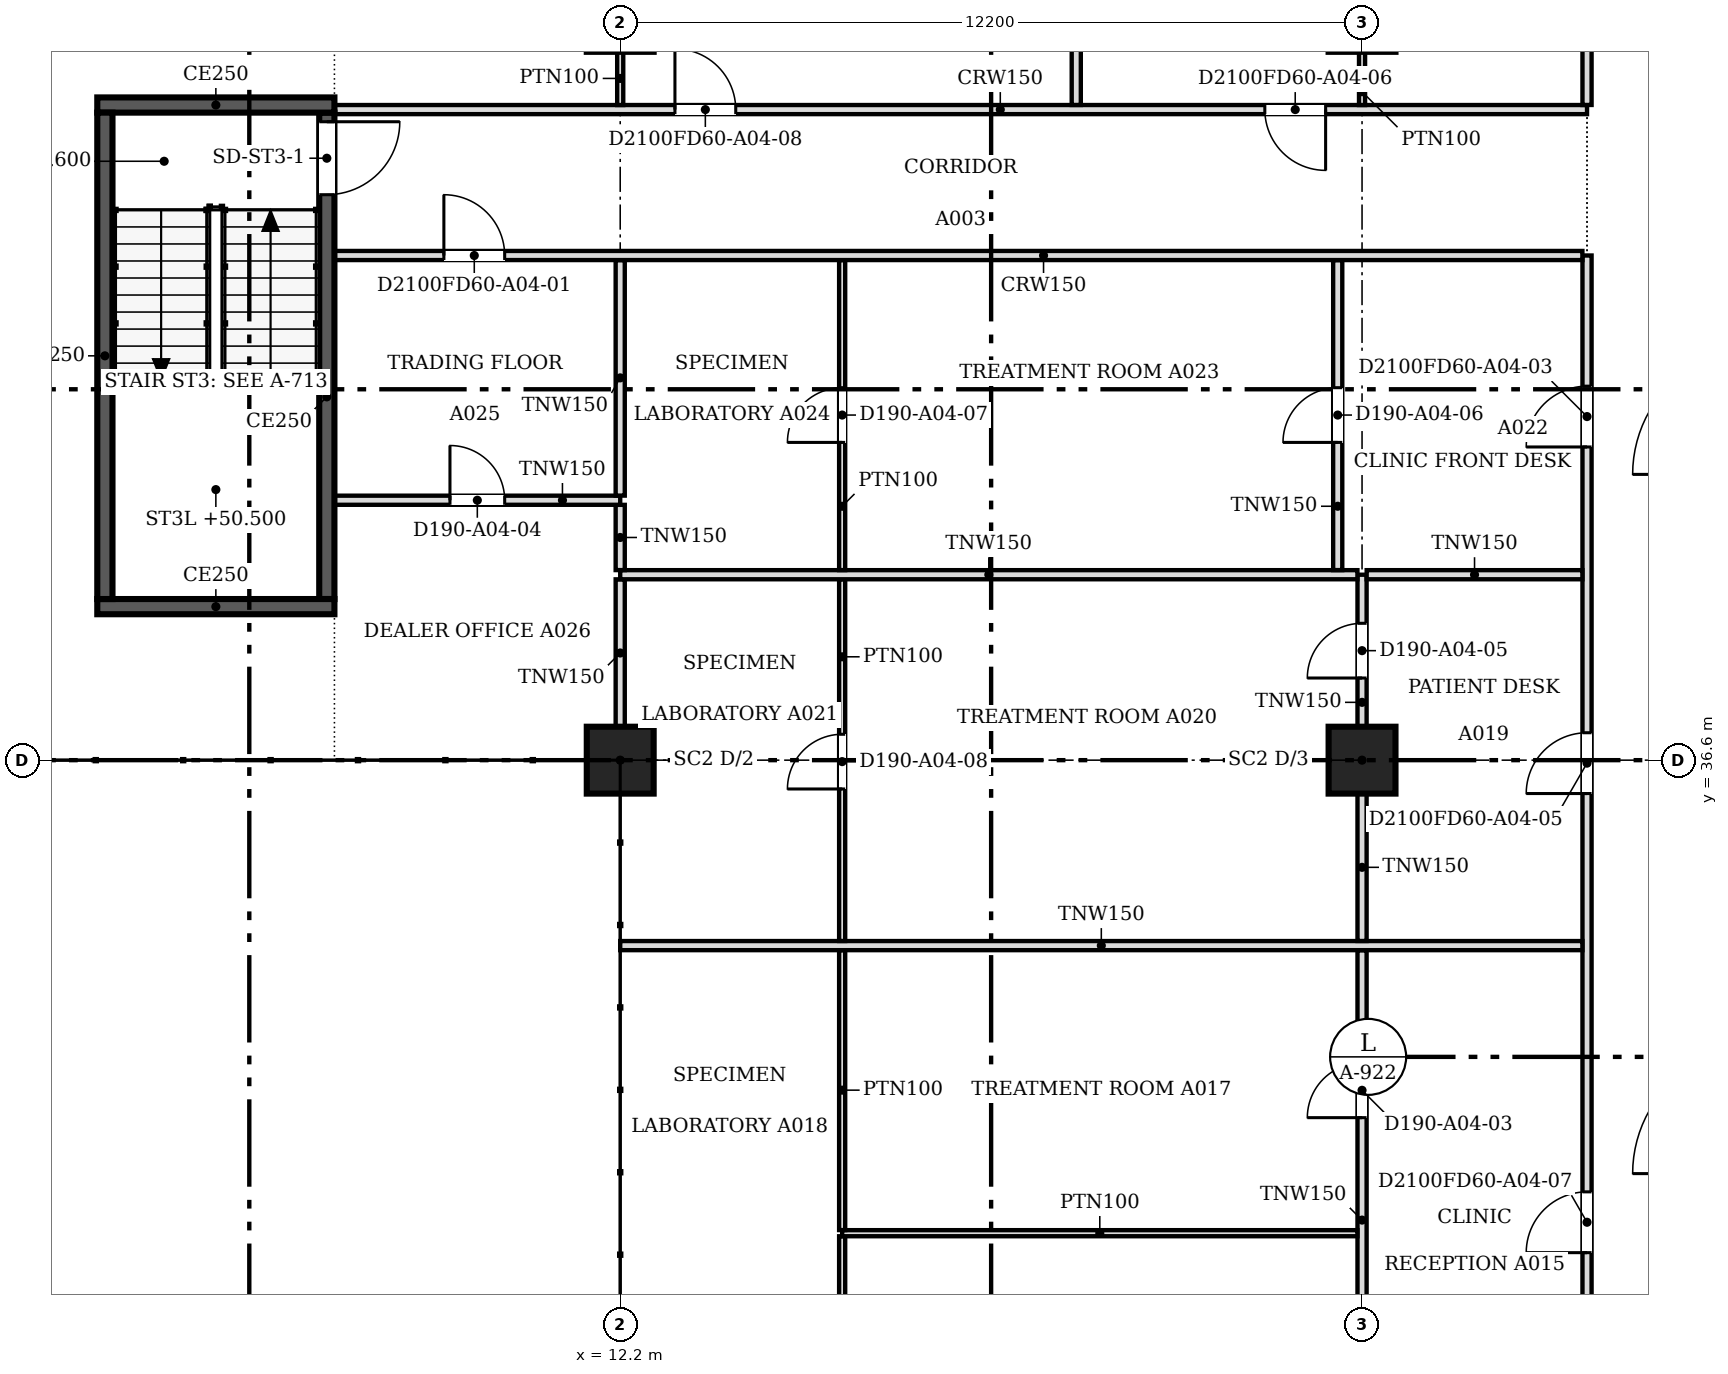
"""IFC4 building model, lengths in metres.
Left out: names, types, materials, properties, quantities, classifications, styles, units other than length and angle.
Written with IfcOpenShell. Run it as: python <this file> out.ifc"""

import sys

from ifc_helpers import new_model, si_unit, direction, frame, frame_2d, origin, origin_2d, place, context, subcontext, project, spatial, rectangle, extrude, source, transform, mapped, element, fill, save


model = new_model("IFC4")
c1 = context("Model", 3, precision=1e-05, world=origin(), true_north=direction((0.0, 1.0)))
c2 = subcontext(c1, "Body", "Model", "MODEL_VIEW")
j1 = project(units=[si_unit("LENGTHUNIT", "METRE"), si_unit("PLANEANGLEUNIT", "RADIAN")], contexts=[c1])
p1 = place(None, origin())
s1 = spatial("IfcSite", under=j1, at=p1, CompositionType="ELEMENT")
p2 = place(p1, origin())
s2 = spatial("IfcBuilding", under=s1, at=p2, CompositionType="ELEMENT")
p3 = place(p2, frame((0.0, 0.0, 48.6)))
s3 = spatial("IfcBuildingStorey", under=s2, at=p3, CompositionType="ELEMENT", Elevation=48.6)
for number, where, z_axis, x_axis in (
    (1, (12.2, 36.6, 0.0), (0.0, 0.0, 1.0), (1.0, 0.0, 0.0)),
    (2, (24.4, 36.6, 0.0), (0.0, 0.0, 1.0), (1.0, 0.0, 0.0)),
):
    element("IfcColumn", number, at=place(p3, frame(where, z_axis=z_axis, x_axis=x_axis)), inside=s3, PredefinedType="COLUMN", context=c2, shape_type="SweptSolid", body=[
        extrude(rectangle(XDim=1.1, YDim=1.1, at=origin_2d()), origin(), (0.0, 0.0, 1.0), 3.6),
    ])
p4 = place(p3, frame((7.5, 39.125, 0.0), z_axis=(0.0, 0.0, 1.0), x_axis=(-1.0, 0.0, 0.0)))
e3 = element("IfcWall", 3, at=p4, inside=s3, PredefinedType="SOLIDWALL", context=c2, shape_type="SweptSolid", body=[
    extrude(rectangle(XDim=3.9, YDim=0.25, at=frame_2d((1.95, 0.0))), origin(), (0.0, 0.0, 1.0), 3.8),
])
p5 = place(p3, frame((3.725, 39.25, 0.0), z_axis=(0.0, 0.0, 1.0), x_axis=(0.0, 1.0, 0.0)))
e4 = element("IfcWall", 4, at=p5, inside=s3, PredefinedType="SOLIDWALL", context=c2, shape_type="SweptSolid", body=[
    extrude(rectangle(XDim=8.0, YDim=0.25, at=frame_2d((4.0, 0.0))), origin(), (0.0, 0.0, 1.0), 3.8),
])
p6 = place(p3, frame((3.6, 47.375, 0.0), z_axis=(0.0, 0.0, 1.0), x_axis=(1.0, 0.0, 0.0)))
e5 = element("IfcWall", 5, at=p6, inside=s3, PredefinedType="SOLIDWALL", context=c2, shape_type="SweptSolid", body=[
    extrude(rectangle(XDim=3.9, YDim=0.25, at=frame_2d((1.95, 0.0))), origin(), (0.0, 0.0, 1.0), 3.8),
])
p7 = place(p3, frame((7.375, 47.25, 0.0), z_axis=(0.0, 0.0, 1.0), x_axis=(0.0, -1.0, 0.0)))
e6 = element("IfcWall", 6, at=p7, inside=s3, PredefinedType="SOLIDWALL", context=c2, shape_type="SweptSolid", body=[
    extrude(rectangle(XDim=8.0, YDim=0.25, at=frame_2d((4.0, 0.0))), origin(), (0.0, 0.0, 1.0), 3.8),
])
m1 = source(origin(), c2, "Body", "SweptSolid", [
    extrude(rectangle(XDim=1.2, YDim=2.1, at=frame_2d((0.6, 1.05))), frame((0.0, 0.135, 0.0), z_axis=(0.0, -1.0, 0.0), x_axis=(1.0, 0.0, 0.0)), (0.0, 0.0, 1.0), 0.27),
])
p8 = place(p7, frame((0.15, 0.0, 0.0)))
e7 = element("IfcOpeningElement", 7, at=p8, cuts=e6, PredefinedType="OPENING", context=c2, shape_type="MappedRepresentation", body=[
    mapped(m1, transform((0.0, 0.0, 0.0), scale=1.0)),
])
p9 = place(p3, frame((28.1, 18.8, 0.0), z_axis=(0.0, 0.0, 1.0), x_axis=(0.0, 1.0, 0.0)))
e8 = element("IfcWall", 8, at=p9, inside=s3, PredefinedType="PARTITIONING", context=c2, shape_type="SweptSolid", body=[
    extrude(rectangle(XDim=26.1, YDim=0.15, at=frame_2d((13.05, 0.0))), origin(), (0.0, 0.0, 1.0), 3.067),
])
m2 = source(origin(), c2, "Body", "SweptSolid", [
    extrude(rectangle(XDim=0.9, YDim=2.1, at=frame_2d((0.45, 1.05))), frame((0.0, 0.085, 0.0), z_axis=(0.0, -1.0, 0.0), x_axis=(1.0, 0.0, 0.0)), (0.0, 0.0, 1.0), 0.17),
])
p10 = place(p9, frame((1.1, 0.0, 0.0)))
e9 = element("IfcOpeningElement", 9, at=p10, cuts=e8, PredefinedType="OPENING", context=c2, shape_type="MappedRepresentation", body=[
    mapped(m2, transform((0.0, 0.0, 0.0), scale=1.0)),
])
m3 = source(origin(), c2, "Body", "SweptSolid", [
    extrude(rectangle(XDim=1.0, YDim=2.1, at=frame_2d((0.5, 1.05))), frame((0.0, 0.085, 0.0), z_axis=(0.0, -1.0, 0.0), x_axis=(1.0, 0.0, 0.0)), (0.0, 0.0, 1.0), 0.17),
])
p11 = place(p9, frame((22.951, 0.0, 0.0)))
e10 = element("IfcOpeningElement", 10, at=p11, cuts=e8, PredefinedType="OPENING", context=c2, shape_type="MappedRepresentation", body=[
    mapped(m3, transform((0.0, 0.0, 0.0), scale=1.0)),
])
p12 = place(p9, frame((17.251, 0.0, 0.0)))
e11 = element("IfcOpeningElement", 11, at=p12, cuts=e8, PredefinedType="OPENING", context=c2, shape_type="MappedRepresentation", body=[
    mapped(m3, transform((0.0, 0.0, 0.0), scale=1.0)),
])
p13 = place(p9, frame((9.7, 0.0, 0.0)))
e12 = element("IfcOpeningElement", 12, at=p13, cuts=e8, PredefinedType="OPENING", context=c2, shape_type="MappedRepresentation", body=[
    mapped(m3, transform((0.0, 0.0, 0.0), scale=1.0)),
])
p14 = place(p3, frame((15.85, 24.476, 0.0), z_axis=(0.0, 0.0, 1.0), x_axis=(0.0, 1.0, 0.0)))
e13 = element("IfcWall", 13, at=p14, inside=s3, PredefinedType="PARTITIONING", context=c2, shape_type="SweptSolid", body=[
    extrude(rectangle(XDim=4.293, YDim=0.1, at=frame_2d((2.146, 0.0))), origin(), (0.0, 0.0, 1.0), 3.067),
])
m4 = source(origin(), c2, "Body", "SweptSolid", [
    extrude(rectangle(XDim=0.9, YDim=2.1, at=frame_2d((0.45, 1.05))), frame((0.0, 0.06, 0.0), z_axis=(0.0, -1.0, 0.0), x_axis=(1.0, 0.0, 0.0)), (0.0, 0.0, 1.0), 0.12),
])
p15 = place(p14, frame((1.7, 0.0, 0.0)))
e14 = element("IfcOpeningElement", 14, at=p15, cuts=e13, PredefinedType="OPENING", context=c2, shape_type="MappedRepresentation", body=[
    mapped(m4, transform((0.0, 0.0, 0.0), scale=1.0)),
])
p16 = place(p3, frame((24.4, 24.951, 0.0), z_axis=(0.0, 0.0, 1.0), x_axis=(0.0, 1.0, 0.0)))
e15 = element("IfcWall", 15, at=p16, inside=s3, PredefinedType="PARTITIONING", context=c2, shape_type="SweptSolid", body=[
    extrude(rectangle(XDim=8.523, YDim=0.15, at=frame_2d((4.262, 0.0))), origin(), (0.0, 0.0, 1.0), 3.067),
])
p17 = place(p16, frame((1.5, 0.0, 0.0)))
e16 = element("IfcOpeningElement", 16, at=p17, cuts=e15, PredefinedType="OPENING", context=c2, shape_type="MappedRepresentation", body=[
    mapped(m2, transform((0.0, 0.0, 0.0), scale=1.0)),
])
p18 = place(p16, frame((5.769, 0.0, 0.0)))
e17 = element("IfcOpeningElement", 17, at=p18, cuts=e15, PredefinedType="OPENING", context=c2, shape_type="MappedRepresentation", body=[
    mapped(m2, transform((0.0, 0.0, 0.0), scale=1.0)),
])
p19 = place(p3, frame((15.85, 28.82, 0.0), z_axis=(0.0, 0.0, 1.0), x_axis=(1.0, 0.0, 0.0)))
e18 = element("IfcWall", 18, at=p19, inside=s3, PredefinedType="PARTITIONING", context=c2, shape_type="SweptSolid", body=[
    extrude(rectangle(XDim=8.474, YDim=0.1, at=frame_2d((4.237, 0.0))), origin(), (0.0, 0.0, 1.0), 3.067),
])
p20 = place(p3, frame((15.85, 28.871, 0.0), z_axis=(0.0, 0.0, 1.0), x_axis=(0.0, 1.0, 0.0)))
e19 = element("IfcWall", 19, at=p20, inside=s3, PredefinedType="PARTITIONING", context=c2, shape_type="SweptSolid", body=[
    extrude(rectangle(XDim=4.603, YDim=0.1, at=frame_2d((2.301, 0.0))), origin(), (0.0, 0.0, 1.0), 3.067),
])
p21 = place(p3, frame((12.2, 33.55, 0.0), z_axis=(0.0, 0.0, 1.0), x_axis=(1.0, 0.0, 0.0)))
e20 = element("IfcWall", 20, at=p21, inside=s3, PredefinedType="PARTITIONING", context=c2, shape_type="SweptSolid", body=[
    extrude(rectangle(XDim=15.824, YDim=0.15, at=frame_2d((7.912, 0.0))), origin(), (0.0, 0.0, 1.0), 3.067),
])
p22 = place(p3, frame((15.85, 33.626, 0.0), z_axis=(0.0, 0.0, 1.0), x_axis=(0.0, 1.0, 0.0)))
e21 = element("IfcWall", 21, at=p22, inside=s3, PredefinedType="PARTITIONING", context=c2, shape_type="SweptSolid", body=[
    extrude(rectangle(XDim=5.948, YDim=0.1, at=frame_2d((2.974, 0.0))), origin(), (0.0, 0.0, 1.0), 3.067),
])
p23 = place(p22, frame((2.5, 0.0, 0.0)))
e22 = element("IfcOpeningElement", 22, at=p23, cuts=e21, PredefinedType="OPENING", context=c2, shape_type="MappedRepresentation", body=[
    mapped(m4, transform((0.0, 0.0, 0.0), scale=1.0)),
])
for number, where, z_axis, x_axis in (
    (23, (24.4, 33.626, 0.0), (0.0, 0.0, 1.0), (0.0, 1.0, 0.0)),
    (24, (12.2, 37.151, 0.0), (0.0, 0.0, 1.0), (0.0, 1.0, 0.0)),
):
    element("IfcWall", number, at=place(p3, frame(where, z_axis=z_axis, x_axis=x_axis)), inside=s3, PredefinedType="PARTITIONING", context=c2, shape_type="SweptSolid", body=[
        extrude(rectangle(XDim=2.423, YDim=0.15, at=frame_2d((1.211, 0.0))), origin(), (0.0, 0.0, 1.0), 3.067),
    ])
p24 = place(p3, frame((24.4, 37.151, 0.0), z_axis=(0.0, 0.0, 1.0), x_axis=(0.0, 1.0, 0.0)))
e25 = element("IfcWall", 25, at=p24, inside=s3, PredefinedType="PARTITIONING", context=c2, shape_type="SweptSolid", body=[
    extrude(rectangle(XDim=2.499, YDim=0.15, at=frame_2d((1.25, 0.0))), origin(), (0.0, 0.0, 1.0), 3.067),
])
p25 = place(p24, frame((0.8, 0.0, 0.0)))
e26 = element("IfcOpeningElement", 26, at=p25, cuts=e25, PredefinedType="OPENING", context=c2, shape_type="MappedRepresentation", body=[
    mapped(m2, transform((0.0, 0.0, 0.0), scale=1.0)),
])
p26 = place(p3, frame((12.2, 39.65, 0.0), z_axis=(0.0, 0.0, 1.0), x_axis=(1.0, 0.0, 0.0)))
e27 = element("IfcWall", 27, at=p26, inside=s3, PredefinedType="PARTITIONING", context=c2, shape_type="SweptSolid", body=[
    extrude(rectangle(XDim=12.124, YDim=0.15, at=frame_2d((6.062, 0.0))), origin(), (0.0, 0.0, 1.0), 3.067),
])
p27 = place(p3, frame((24.476, 39.65, 0.0), z_axis=(0.0, 0.0, 1.0), x_axis=(1.0, 0.0, 0.0)))
e28 = element("IfcWall", 28, at=p27, inside=s3, PredefinedType="PARTITIONING", context=c2, shape_type="SweptSolid", body=[
    extrude(rectangle(XDim=3.548, YDim=0.15, at=frame_2d((1.774, 0.0))), origin(), (0.0, 0.0, 1.0), 3.067),
])
p28 = place(p3, frame((12.2, 39.726, 0.0), z_axis=(0.0, 0.0, 1.0), x_axis=(0.0, 1.0, 0.0)))
e29 = element("IfcWall", 29, at=p28, inside=s3, PredefinedType="PARTITIONING", context=c2, shape_type="SweptSolid", body=[
    extrude(rectangle(XDim=1.073, YDim=0.15, at=frame_2d((0.537, 0.0))), origin(), (0.0, 0.0, 1.0), 3.067),
])
p29 = place(p3, frame((15.85, 39.726, 0.0), z_axis=(0.0, 0.0, 1.0), x_axis=(0.0, 1.0, 0.0)))
e30 = element("IfcWall", 30, at=p29, inside=s3, PredefinedType="PARTITIONING", context=c2, shape_type="SweptSolid", body=[
    extrude(rectangle(XDim=5.098, YDim=0.1, at=frame_2d((2.549, 0.0))), origin(), (0.0, 0.0, 1.0), 3.067),
])
p30 = place(p29, frame((2.1, 0.0, 0.0)))
e31 = element("IfcOpeningElement", 31, at=p30, cuts=e30, PredefinedType="OPENING", context=c2, shape_type="MappedRepresentation", body=[
    mapped(m4, transform((0.0, 0.0, 0.0), scale=1.0)),
])
p31 = place(p3, frame((24.0, 39.726, 0.0), z_axis=(0.0, 0.0, 1.0), x_axis=(0.0, 1.0, 0.0)))
e32 = element("IfcWall", 32, at=p31, inside=s3, PredefinedType="PARTITIONING", context=c2, shape_type="SweptSolid", body=[
    extrude(rectangle(XDim=5.098, YDim=0.15, at=frame_2d((2.549, 0.0))), origin(), (0.0, 0.0, 1.0), 3.067),
])
p32 = place(p31, frame((2.1, 0.0, 0.0)))
e33 = element("IfcOpeningElement", 33, at=p32, cuts=e32, PredefinedType="OPENING", context=c2, shape_type="MappedRepresentation", body=[
    mapped(m2, transform((0.0, 0.0, 0.0), scale=1.0)),
])
p33 = place(p3, frame((12.2, 40.875, 0.0), z_axis=(0.0, 0.0, 1.0), x_axis=(-1.0, 0.0, 0.0)))
e34 = element("IfcWall", 34, at=p33, inside=s3, PredefinedType="PARTITIONING", context=c2, shape_type="SweptSolid", body=[
    extrude(rectangle(XDim=4.7, YDim=0.15, at=frame_2d((2.35, 0.0))), origin(), (0.0, 0.0, 1.0), 3.067),
])
p34 = place(p33, frame((1.9, 0.0, 0.0)))
e35 = element("IfcOpeningElement", 35, at=p34, cuts=e34, PredefinedType="OPENING", context=c2, shape_type="MappedRepresentation", body=[
    mapped(m2, transform((0.0, 0.0, 0.0), scale=1.0)),
])
p35 = place(p3, frame((12.2, 40.951, 0.0), z_axis=(0.0, 0.0, 1.0), x_axis=(0.0, 1.0, 0.0)))
e36 = element("IfcWall", 36, at=p35, inside=s3, PredefinedType="PARTITIONING", context=c2, shape_type="SweptSolid", body=[
    extrude(rectangle(XDim=3.873, YDim=0.15, at=frame_2d((1.937, 0.0))), origin(), (0.0, 0.0, 1.0), 3.067),
])
p36 = place(p3, frame((28.024, 44.9, 0.0), z_axis=(0.0, 0.0, 1.0), x_axis=(-1.0, 0.0, 0.0)))
e37 = element("IfcWall", 37, at=p36, inside=s3, PredefinedType="PARTITIONING", context=c2, shape_type="SweptSolid", body=[
    extrude(rectangle(XDim=20.524, YDim=0.15, at=frame_2d((10.262, 0.0))), origin(), (0.0, 0.0, 1.0), 3.067),
])
p37 = place(p36, frame((17.724, 0.0, 0.0)))
e38 = element("IfcOpeningElement", 38, at=p37, cuts=e37, PredefinedType="OPENING", context=c2, shape_type="MappedRepresentation", body=[
    mapped(m3, transform((0.0, 0.0, 0.0), scale=1.0)),
])
p38 = place(p3, frame((7.5, 47.3, 0.0), z_axis=(0.0, 0.0, 1.0), x_axis=(1.0, 0.0, 0.0)))
e39 = element("IfcWall", 39, at=p38, inside=s3, PredefinedType="PARTITIONING", context=c2, shape_type="SweptSolid", body=[
    extrude(rectangle(XDim=20.6, YDim=0.15, at=frame_2d((10.3, 0.0))), origin(), (0.0, 0.0, 1.0), 3.067),
])
p39 = place(p38, frame((15.301, 0.0, 0.0)))
e40 = element("IfcOpeningElement", 40, at=p39, cuts=e39, PredefinedType="OPENING", context=c2, shape_type="MappedRepresentation", body=[
    mapped(m3, transform((0.0, 0.0, 0.0), scale=1.0)),
])
p40 = place(p38, frame((5.6, 0.0, 0.0)))
e41 = element("IfcOpeningElement", 41, at=p40, cuts=e39, PredefinedType="OPENING", context=c2, shape_type="MappedRepresentation", body=[
    mapped(m3, transform((0.0, 0.0, 0.0), scale=1.0)),
])
p41 = place(p3, frame((19.7, 47.376, 0.0), z_axis=(0.0, 0.0, 1.0), x_axis=(0.0, 1.0, 0.0)))
e42 = element("IfcWall", 42, at=p41, inside=s3, PredefinedType="PARTITIONING", context=c2, shape_type="SweptSolid", body=[
    extrude(rectangle(XDim=7.024, YDim=0.15, at=frame_2d((3.512, 0.0))), origin(), (0.0, 0.0, 1.0), 3.067),
])
p42 = place(p3, frame((28.1, 47.376, 0.0), z_axis=(0.0, 0.0, 1.0), x_axis=(0.0, 1.0, 0.0)))
e43 = element("IfcWall", 43, at=p42, inside=s3, PredefinedType="PARTITIONING", context=c2, shape_type="SweptSolid", body=[
    extrude(rectangle(XDim=3.748, YDim=0.15, at=frame_2d((1.874, 0.0))), origin(), (0.0, 0.0, 1.0), 3.067),
])
for number, where, z_axis, x_axis in (
    (44, (12.2, 48.25, 0.0), (0.0, 0.0, 1.0), (0.0, -1.0, 0.0)),
    (45, (24.4, 48.25, 0.0), (0.0, 0.0, 1.0), (0.0, -1.0, 0.0)),
):
    element("IfcWall", number, at=place(p3, frame(where, z_axis=z_axis, x_axis=x_axis)), inside=s3, PredefinedType="PARTITIONING", context=c2, shape_type="SweptSolid", body=[
        extrude(rectangle(XDim=0.875, YDim=0.1, at=frame_2d((0.438, 0.0))), origin(), (0.0, 0.0, 1.0), 3.067),
    ])
m5 = source(origin(), c2, "Body", "SweptSolid", [
    extrude(rectangle(XDim=1.2, YDim=2.1, at=frame_2d((0.6, 1.05))), frame((0.0, 0.025, 0.0), z_axis=(0.0, -1.0, 0.0), x_axis=(1.0, 0.0, 0.0)), (0.0, 0.0, 1.0), 0.05),
])
p43 = place(p8, origin())
e46 = element("IfcDoor", 46, at=p43, inside=s3, OperationType="SINGLE_SWING_LEFT", PredefinedType="DOOR", context=c2, shape_type="MappedRepresentation", body=[
    mapped(m5, transform((0.0, 0.0, 0.0), scale=1.0)),
])
fill(e7, e46)
m6 = source(origin(), c2, "Body", "SweptSolid", [
    extrude(rectangle(XDim=0.9, YDim=2.1, at=frame_2d((0.45, 1.05))), frame((0.0, 0.025, 0.0), z_axis=(0.0, -1.0, 0.0), x_axis=(1.0, 0.0, 0.0)), (0.0, 0.0, 1.0), 0.05),
])
p44 = place(p18, origin())
e47 = element("IfcDoor", 47, at=p44, inside=s3, OperationType="SINGLE_SWING_LEFT", PredefinedType="DOOR", context=c2, shape_type="MappedRepresentation", body=[
    mapped(m6, transform((0.0, 0.0, 0.0), scale=1.0)),
])
fill(e17, e47)
m7 = source(origin(), c2, "Body", "SweptSolid", [
    extrude(rectangle(XDim=1.0, YDim=2.1, at=frame_2d((0.5, 1.05))), frame((0.0, 0.025, 0.0), z_axis=(0.0, -1.0, 0.0), x_axis=(1.0, 0.0, 0.0)), (0.0, 0.0, 1.0), 0.05),
])
p45 = place(p37, origin())
e48 = element("IfcDoor", 48, at=p45, inside=s3, OperationType="SINGLE_SWING_RIGHT", PredefinedType="DOOR", context=c2, shape_type="MappedRepresentation", body=[
    mapped(m7, transform((0.0, 0.0, 0.0), scale=1.0)),
])
fill(e38, e48)
p46 = place(p34, origin())
e49 = element("IfcDoor", 49, at=p46, inside=s3, OperationType="SINGLE_SWING_RIGHT", PredefinedType="DOOR", context=c2, shape_type="MappedRepresentation", body=[
    mapped(m6, transform((0.0, 0.0, 0.0), scale=1.0)),
])
fill(e35, e49)
p47 = place(p25, origin())
e50 = element("IfcDoor", 50, at=p47, inside=s3, OperationType="SINGLE_SWING_LEFT", PredefinedType="DOOR", context=c2, shape_type="MappedRepresentation", body=[
    mapped(m6, transform((0.0, 0.0, 0.0), scale=1.0)),
])
fill(e26, e50)
p48 = place(p32, origin())
e51 = element("IfcDoor", 51, at=p48, inside=s3, OperationType="SINGLE_SWING_LEFT", PredefinedType="DOOR", context=c2, shape_type="MappedRepresentation", body=[
    mapped(m6, transform((0.0, 0.0, 0.0), scale=1.0)),
])
fill(e33, e51)
p49 = place(p30, origin())
e52 = element("IfcDoor", 52, at=p49, inside=s3, OperationType="SINGLE_SWING_LEFT", PredefinedType="DOOR", context=c2, shape_type="MappedRepresentation", body=[
    mapped(m6, transform((0.0, 0.0, 0.0), scale=1.0)),
])
fill(e31, e52)
p50 = place(p11, origin())
e53 = element("IfcDoor", 53, at=p50, inside=s3, OperationType="SINGLE_SWING_LEFT", PredefinedType="DOOR", context=c2, shape_type="MappedRepresentation", body=[
    mapped(m7, transform((0.0, 0.0, 0.0), scale=1.0)),
])
fill(e10, e53)
p51 = place(p23, origin())
e54 = element("IfcDoor", 54, at=p51, inside=s3, OperationType="SINGLE_SWING_LEFT", PredefinedType="DOOR", context=c2, shape_type="MappedRepresentation", body=[
    mapped(m6, transform((0.0, 0.0, 0.0), scale=1.0)),
])
fill(e22, e54)
p52 = place(p12, origin())
e55 = element("IfcDoor", 55, at=p52, inside=s3, OperationType="SINGLE_SWING_LEFT", PredefinedType="DOOR", context=c2, shape_type="MappedRepresentation", body=[
    mapped(m7, transform((0.0, 0.0, 0.0), scale=1.0)),
])
fill(e11, e55)
p53 = place(p39, origin())
e56 = element("IfcDoor", 56, at=p53, inside=s3, OperationType="SINGLE_SWING_RIGHT", PredefinedType="DOOR", context=c2, shape_type="MappedRepresentation", body=[
    mapped(m7, transform((0.0, 0.0, 0.0), scale=1.0)),
])
fill(e40, e56)
p54 = place(p13, origin())
e57 = element("IfcDoor", 57, at=p54, inside=s3, OperationType="SINGLE_SWING_LEFT", PredefinedType="DOOR", context=c2, shape_type="MappedRepresentation", body=[
    mapped(m7, transform((0.0, 0.0, 0.0), scale=1.0)),
])
fill(e12, e57)
p55 = place(p40, origin())
e58 = element("IfcDoor", 58, at=p55, inside=s3, OperationType="SINGLE_SWING_LEFT", PredefinedType="DOOR", context=c2, shape_type="MappedRepresentation", body=[
    mapped(m7, transform((0.0, 0.0, 0.0), scale=1.0)),
])
fill(e41, e58)
save(model, sys.argv[1])
